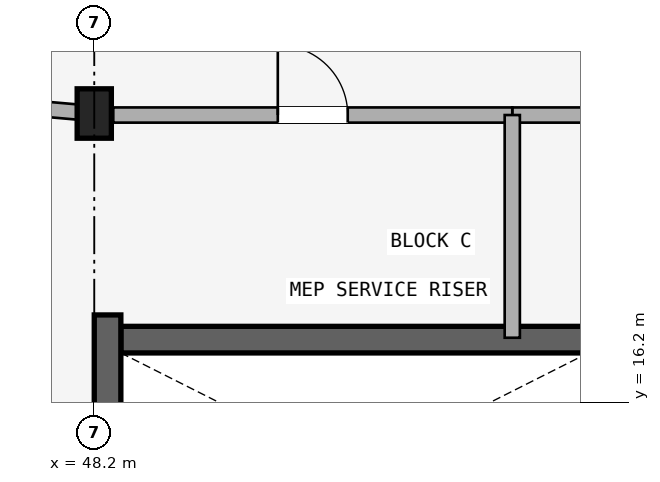
"""IFC4 building model, lengths in metres.
Left out: names, types, materials, properties, quantities, classifications, styles, units other than length and angle.
Written with IfcOpenShell. Run it as: python <this file> out.ifc"""

import sys

from ifc_helpers import new_model, si_unit, direction, frame, frame_2d, origin, origin_2d, place, context, subcontext, project, spatial, rectangle, extrude, element, fill, save


model = new_model("IFC4")
c1 = context("Model", 3, precision=1e-05, world=origin(), true_north=direction((0.0, 1.0)))
c2 = subcontext(c1, "Body", "Model", "MODEL_VIEW")
j1 = project(units=[si_unit("LENGTHUNIT", "METRE"), si_unit("PLANEANGLEUNIT", "RADIAN")], contexts=[c1])
p1 = place(None, origin())
s1 = spatial("IfcSite", under=j1, at=p1, CompositionType="ELEMENT")
p2 = place(p1, origin())
s2 = spatial("IfcBuilding", under=s1, at=p2, CompositionType="ELEMENT")
p3 = place(p2, frame((0.0, 0.0, 30.75)))
s3 = spatial("IfcBuildingStorey", under=s2, at=p3, CompositionType="ELEMENT", Elevation=30.75)
p4 = place(p3, frame((48.55, 17.025, 0.0), z_axis=(0.0, 0.0, 1.0), x_axis=(1.0, 0.0, 0.0)))
e1 = element("IfcWall", 1, at=p4, inside=s3, PredefinedType="SHEAR", context=c2, shape_type="SweptSolid", body=[
    extrude(rectangle(XDim=8.075, YDim=0.35, at=frame_2d((4.038, 0.0))), origin(), (0.0, 0.0, 1.0), 2.91),
])
p5 = place(p4, frame((6.38, 0.0, 0.0)))
e2 = element("IfcOpeningElement", 2, at=p5, cuts=e1, PredefinedType="OPENING", context=c2, shape_type="SweptSolid", body=[
    extrude(rectangle(XDim=1.24, YDim=2.15, at=frame_2d((0.62, 1.075))), frame((0.0, 0.185, 0.0), z_axis=(0.0, -1.0, 0.0), x_axis=(1.0, 0.0, 0.0)), (0.0, 0.0, 1.0), 0.37),
])
p6 = place(p3, frame((48.375, 17.35, 0.0), z_axis=(0.0, 0.0, 1.0), x_axis=(0.0, -1.0, 0.0)))
e3 = element("IfcWall", 3, at=p6, inside=s3, PredefinedType="SHEAR", context=c2, shape_type="SweptSolid", body=[
    extrude(rectangle(XDim=3.6, YDim=0.35, at=frame_2d((1.8, 0.0))), origin(), (0.0, 0.0, 1.0), 2.91),
])
p7 = place(p3, frame((48.2, 20.0, 0.0), z_axis=(0.0, 0.0, 1.0), x_axis=(1.0, 0.0, 0.0)))
e4 = element("IfcColumn", 4, at=p7, inside=s3, PredefinedType="COLUMN", context=c2, shape_type="SweptSolid", body=[
    extrude(rectangle(XDim=0.45, YDim=0.65, at=origin_2d()), origin(), (0.0, 0.0, 1.0), 2.91),
])
p8 = place(p3, frame((53.7, 19.98, 0.0), z_axis=(0.0, 0.0, 1.0), x_axis=(1.0, 0.0, 0.0)))
e5 = element("IfcWall", 5, at=p8, inside=s3, PredefinedType="STANDARD", context=c2, shape_type="SweptSolid", body=[
    extrude(rectangle(XDim=5.65, YDim=0.2, at=frame_2d((2.825, 0.0))), origin(), (0.0, 0.0, 1.0), 2.352),
])
p9 = place(p8, frame((1.923, 0.0, 0.0)))
e6 = element("IfcOpeningElement", 6, at=p9, cuts=e5, PredefinedType="OPENING", context=c2, shape_type="SweptSolid", body=[
    extrude(rectangle(XDim=1.24, YDim=2.15, at=frame_2d((0.62, 1.075))), frame((0.0, 0.11, 0.0), z_axis=(0.0, -1.0, 0.0), x_axis=(1.0, 0.0, 0.0)), (0.0, 0.0, 1.0), 0.22),
])
p10 = place(p3, frame((48.45, 19.98, 0.0), z_axis=(0.0, 0.0, 1.0), x_axis=(1.0, 0.0, 0.0)))
e7 = element("IfcWall", 7, at=p10, inside=s3, PredefinedType="STANDARD", context=c2, shape_type="SweptSolid", body=[
    extrude(rectangle(XDim=5.25, YDim=0.2, at=frame_2d((2.625, 0.0))), origin(), (0.0, 0.0, 1.0), 2.352),
])
p11 = place(p10, frame((2.165, 0.0, 0.0)))
e8 = element("IfcOpeningElement", 8, at=p11, cuts=e7, PredefinedType="OPENING", context=c2, shape_type="SweptSolid", body=[
    extrude(rectangle(XDim=0.92, YDim=2.1, at=frame_2d((0.46, 1.05))), frame((0.0, 0.11, 0.0), z_axis=(0.0, -1.0, 0.0), x_axis=(1.0, 0.0, 0.0)), (0.0, 0.0, 1.0), 0.22),
])
p12 = place(p3, frame((53.7, 19.98, 0.0), z_axis=(0.0, 0.0, 1.0), x_axis=(0.0, -1.0, 0.0)))
e9 = element("IfcWall", 9, at=p12, inside=s3, PredefinedType="STANDARD", context=c2, shape_type="SweptSolid", body=[
    extrude(rectangle(XDim=2.93, YDim=0.2, at=frame_2d((1.465, 0.0))), origin(), (0.0, 0.0, 1.0), 2.352),
])
p13 = place(p3, frame((48.2, 20.0, 0.0), z_axis=(0.0, 0.0, 1.0), x_axis=(-0.996193663584, 0.087167566415, 0.0)))
e10 = element("IfcWall", 10, at=p13, inside=s3, PredefinedType="STANDARD", context=c2, shape_type="SweptSolid", body=[
    extrude(rectangle(XDim=4.916, YDim=0.2, at=frame_2d((2.458, 0.0))), origin(), (0.0, 0.0, 1.0), 2.352),
])
p14 = place(p13, frame((1.888, 0.0, 0.0)))
e11 = element("IfcOpeningElement", 11, at=p14, cuts=e10, PredefinedType="OPENING", context=c2, shape_type="SweptSolid", body=[
    extrude(rectangle(XDim=1.14, YDim=2.15, at=frame_2d((0.57, 1.075))), frame((0.0, 0.11, 0.0), z_axis=(0.0, -1.0, 0.0), x_axis=(1.0, 0.0, 0.0)), (0.0, 0.0, 1.0), 0.22),
])
p15 = place(p11, frame((0.92, 0.0, 0.0), z_axis=(0.0, 0.0, 1.0), x_axis=(-1.0, 0.0, 0.0)))
e12 = element("IfcDoor", 12, at=p15, inside=s3, OperationType="SINGLE_SWING_RIGHT", PredefinedType="DOOR", context=c2, shape_type="SweptSolid", body=[
    extrude(rectangle(XDim=0.92, YDim=2.1, at=frame_2d((0.46, 1.05))), frame((0.0, 0.025, 0.0), z_axis=(0.0, -1.0, 0.0), x_axis=(1.0, 0.0, 0.0)), (0.0, 0.0, 1.0), 0.05),
])
fill(e8, e12)
save(model, sys.argv[1])
